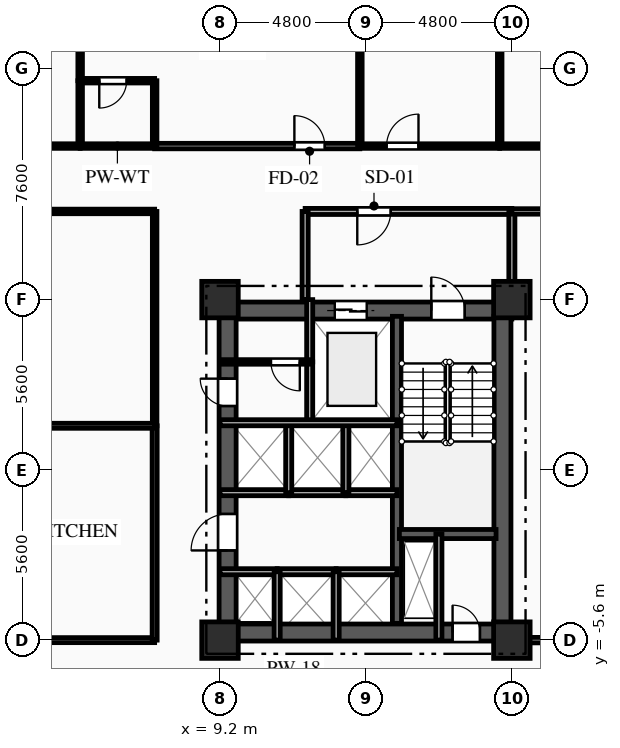
"""IFC4 building model, lengths in metres.
Left out: names, types, materials, properties, quantities, classifications, styles, units other than length and angle.
Written with IfcOpenShell. Run it as: python <this file> out.ifc"""

import sys

from ifc_helpers import new_model, si_unit, direction, frame, frame_2d, origin, origin_2d, place, context, subcontext, project, spatial, rectangle, extrude, element, fill, save


model = new_model("IFC4")
c1 = context("Model", 3, precision=1e-05, world=origin(), true_north=direction((0.0, 1.0)))
c2 = subcontext(c1, "Body", "Model", "MODEL_VIEW")
j1 = project(units=[si_unit("LENGTHUNIT", "METRE"), si_unit("PLANEANGLEUNIT", "RADIAN")], contexts=[c1])
p1 = place(None, origin())
s1 = spatial("IfcSite", under=j1, at=p1, CompositionType="ELEMENT")
p2 = place(p1, origin())
s2 = spatial("IfcBuilding", under=s1, at=p2, CompositionType="ELEMENT")
p3 = place(p2, frame((0.0, 0.0, 27.0)))
s3 = spatial("IfcBuildingStorey", under=s2, at=p3, CompositionType="ELEMENT", Elevation=27.0)
for number, where, z_axis, x_axis in (
    (1, (9.2, -5.6, 0.0), (0.0, 0.0, 1.0), (1.0, 0.0, 0.0)),
    (2, (9.2, 5.6, 0.0), (0.0, 0.0, 1.0), (1.0, 0.0, 0.0)),
    (3, (18.8, -5.6, 0.0), (0.0, 0.0, 1.0), (1.0, 0.0, 0.0)),
    (4, (18.8, 5.6, 0.0), (0.0, 0.0, 1.0), (1.0, 0.0, 0.0)),
):
    element("IfcColumn", number, at=place(p3, frame(where, z_axis=z_axis, x_axis=x_axis)), inside=s3, PredefinedType="COLUMN", context=c2, shape_type="SweptSolid", body=[
        extrude(rectangle(XDim=1.2, YDim=1.2, at=origin_2d()), origin(), (0.0, 0.0, 1.0), 3.35),
    ])
p4 = place(p3, frame((9.2, 5.24, 0.0), z_axis=(0.0, 0.0, 1.0), x_axis=(1.0, 0.0, 0.0)))
e5 = element("IfcWall", 5, at=p4, inside=s3, PredefinedType="SHEAR", context=c2, shape_type="SweptSolid", body=[
    extrude(rectangle(XDim=9.6, YDim=0.56, at=frame_2d((4.8, 0.0))), origin(), (0.0, 0.0, 1.0), 3.035),
])
p5 = place(p4, frame((6.95, 0.0, 0.0)))
e6 = element("IfcOpeningElement", 6, at=p5, cuts=e5, PredefinedType="OPENING", context=c2, shape_type="SweptSolid", body=[
    extrude(rectangle(XDim=1.1, YDim=2.15, at=frame_2d((0.55, 1.075))), frame((0.0, 0.29, 0.0), z_axis=(0.0, -1.0, 0.0), x_axis=(1.0, 0.0, 0.0)), (0.0, 0.0, 1.0), 0.58),
])
p6 = place(p4, frame((3.775, 0.0, 0.0)))
e7 = element("IfcOpeningElement", 7, at=p6, cuts=e5, PredefinedType="OPENING", context=c2, shape_type="SweptSolid", body=[
    extrude(rectangle(XDim=1.05, YDim=2.1, at=frame_2d((0.525, 1.05))), frame((0.0, 0.29, 0.0), z_axis=(0.0, -1.0, 0.0), x_axis=(1.0, 0.0, 0.0)), (0.0, 0.0, 1.0), 0.58),
])
p7 = place(p3, frame((9.2, -5.35, 0.0), z_axis=(0.0, 0.0, 1.0), x_axis=(1.0, 0.0, 0.0)))
e8 = element("IfcWall", 8, at=p7, inside=s3, PredefinedType="SHEAR", context=c2, shape_type="SweptSolid", body=[
    extrude(rectangle(XDim=9.6, YDim=0.56, at=frame_2d((4.8, 0.0))), origin(), (0.0, 0.0, 1.0), 3.035),
])
p8 = place(p7, frame((7.65, 0.0, 0.0)))
e9 = element("IfcOpeningElement", 9, at=p8, cuts=e8, PredefinedType="OPENING", context=c2, shape_type="SweptSolid", body=[
    extrude(rectangle(XDim=0.9, YDim=2.1, at=frame_2d((0.45, 1.05))), frame((0.0, 0.29, 0.0), z_axis=(0.0, -1.0, 0.0), x_axis=(1.0, 0.0, 0.0)), (0.0, 0.0, 1.0), 0.58),
])
p9 = place(p3, frame((9.45, -5.05, 0.0), z_axis=(0.0, 0.0, 1.0), x_axis=(0.0, 1.0, 0.0)))
e10 = element("IfcWall", 10, at=p9, inside=s3, PredefinedType="SHEAR", context=c2, shape_type="SweptSolid", body=[
    extrude(rectangle(XDim=10.1, YDim=0.56, at=frame_2d((5.05, 0.0))), origin(), (0.0, 0.0, 1.0), 3.035),
])
p10 = place(p9, frame((7.15, 0.0, 0.0)))
e11 = element("IfcOpeningElement", 11, at=p10, cuts=e10, PredefinedType="OPENING", context=c2, shape_type="SweptSolid", body=[
    extrude(rectangle(XDim=0.9, YDim=2.1, at=frame_2d((0.45, 1.05))), frame((0.0, 0.29, 0.0), z_axis=(0.0, -1.0, 0.0), x_axis=(1.0, 0.0, 0.0)), (0.0, 0.0, 1.0), 0.58),
])
p11 = place(p9, frame((2.4, 0.0, 0.0)))
e12 = element("IfcOpeningElement", 12, at=p11, cuts=e10, PredefinedType="OPENING", context=c2, shape_type="SweptSolid", body=[
    extrude(rectangle(XDim=1.2, YDim=2.15, at=frame_2d((0.6, 1.075))), frame((0.0, 0.29, 0.0), z_axis=(0.0, -1.0, 0.0), x_axis=(1.0, 0.0, 0.0)), (0.0, 0.0, 1.0), 0.58),
])
p12 = place(p3, frame((18.49, -5.05, 0.0), z_axis=(0.0, 0.0, 1.0), x_axis=(0.0, 1.0, 0.0)))
e13 = element("IfcWall", 13, at=p12, inside=s3, PredefinedType="SHEAR", context=c2, shape_type="SweptSolid", body=[
    extrude(rectangle(XDim=10.1, YDim=0.56, at=frame_2d((5.05, 0.0))), origin(), (0.0, 0.0, 1.0), 3.035),
])
p13 = place(p3, frame((15.02, -5.05, 0.0), z_axis=(0.0, 0.0, 1.0), x_axis=(0.0, 1.0, 0.0)))
e14 = element("IfcWall", 14, at=p13, inside=s3, PredefinedType="SHEAR", context=c2, shape_type="SweptSolid", body=[
    extrude(rectangle(XDim=10.1, YDim=0.3, at=frame_2d((5.05, 0.0))), origin(), (0.0, 0.0, 1.0), 3.035),
])
p14 = place(p3, frame((15.1, -2.11, 0.0), z_axis=(0.0, 0.0, 1.0), x_axis=(1.0, 0.0, 0.0)))
e15 = element("IfcWall", 15, at=p14, inside=s3, PredefinedType="SHEAR", context=c2, shape_type="SweptSolid", body=[
    extrude(rectangle(XDim=3.18, YDim=0.3, at=frame_2d((1.59, 0.0))), origin(), (0.0, 0.0, 1.0), 3.035),
])
p15 = place(p3, frame((16.4, -2.11, 0.0), z_axis=(0.0, 0.0, 1.0), x_axis=(0.0, -1.0, 0.0)))
e16 = element("IfcWall", 16, at=p15, inside=s3, PredefinedType="PARTITIONING", context=c2, shape_type="SweptSolid", body=[
    extrude(rectangle(XDim=3.49, YDim=0.2, at=frame_2d((1.745, 0.0))), origin(), (0.0, 0.0, 1.0), 3.035),
])
p16 = place(p3, frame((12.15, 3.55, 0.0), z_axis=(0.0, 0.0, 1.0), x_axis=(0.0, -1.0, 0.0)))
e17 = element("IfcWall", 17, at=p16, inside=s3, PredefinedType="PARTITIONING", context=c2, shape_type="SweptSolid", body=[
    extrude(rectangle(XDim=2.0, YDim=0.2, at=frame_2d((1.0, 0.0))), origin(), (0.0, 0.0, 1.0), 3.035),
])
p17 = place(p3, frame((12.15, 5.6, 0.0), z_axis=(0.0, 0.0, 1.0), x_axis=(0.0, -1.0, 0.0)))
e18 = element("IfcWall", 18, at=p17, inside=s3, PredefinedType="PARTITIONING", context=c2, shape_type="SweptSolid", body=[
    extrude(rectangle(XDim=2.05, YDim=0.2, at=frame_2d((1.025, 0.0))), origin(), (0.0, 0.0, 1.0), 3.035),
])
p18 = place(p3, frame((18.8, 8.5, 0.0), z_axis=(0.0, 0.0, 1.0), x_axis=(-1.0, 0.0, 0.0)))
e19 = element("IfcWall", 19, at=p18, inside=s3, PredefinedType="PARTITIONING", context=c2, shape_type="SweptSolid", body=[
    extrude(rectangle(XDim=6.8, YDim=0.2, at=frame_2d((3.4, 0.0))), origin(), (0.0, 0.0, 1.0), 3.035),
])
p19 = place(p18, frame((3.985, 0.0, 0.0)))
e20 = element("IfcOpeningElement", 20, at=p19, cuts=e19, PredefinedType="OPENING", context=c2, shape_type="SweptSolid", body=[
    extrude(rectangle(XDim=1.1, YDim=2.15, at=frame_2d((0.55, 1.075))), frame((0.0, 0.11, 0.0), z_axis=(0.0, -1.0, 0.0), x_axis=(1.0, 0.0, 0.0)), (0.0, 0.0, 1.0), 0.22),
])
p20 = place(p3, frame((12.0, 8.5, 0.0), z_axis=(0.0, 0.0, 1.0), x_axis=(0.0, -1.0, 0.0)))
e21 = element("IfcWall", 21, at=p20, inside=s3, PredefinedType="PARTITIONING", context=c2, shape_type="SweptSolid", body=[
    extrude(rectangle(XDim=2.9, YDim=0.2, at=frame_2d((1.45, 0.0))), origin(), (0.0, 0.0, 1.0), 3.035),
])
p21 = place(p3, frame((18.8, 5.6, 0.0), z_axis=(0.0, 0.0, 1.0), x_axis=(0.0, 1.0, 0.0)))
e22 = element("IfcWall", 22, at=p21, inside=s3, PredefinedType="PARTITIONING", context=c2, shape_type="SweptSolid", body=[
    extrude(rectangle(XDim=2.9, YDim=0.2, at=frame_2d((1.45, 0.0))), origin(), (0.0, 0.0, 1.0), 2.52),
])
p22 = place(p3, frame((12.15, 3.55, 0.0), z_axis=(0.0, 0.0, 1.0), x_axis=(-1.0, 0.0, 0.0)))
e23 = element("IfcWall", 23, at=p22, inside=s3, PredefinedType="PARTITIONING", context=c2, shape_type="SweptSolid", body=[
    extrude(rectangle(XDim=2.95, YDim=0.15, at=frame_2d((1.475, 0.0))), origin(), (0.0, 0.0, 1.0), 3.035),
])
p23 = place(p22, frame((0.325, 0.0, 0.0)))
e24 = element("IfcOpeningElement", 24, at=p23, cuts=e23, PredefinedType="OPENING", context=c2, shape_type="SweptSolid", body=[
    extrude(rectangle(XDim=0.95, YDim=2.1, at=frame_2d((0.475, 1.05))), frame((0.0, 0.085, 0.0), z_axis=(0.0, -1.0, 0.0), x_axis=(1.0, 0.0, 0.0)), (0.0, 0.0, 1.0), 0.17),
])
p24 = place(p3, frame((9.2, -3.35, 0.0), z_axis=(0.0, 0.0, 1.0), x_axis=(1.0, 0.0, 0.0)))
e25 = element("IfcWall", 25, at=p24, inside=s3, PredefinedType="PARTITIONING", context=c2, shape_type="SweptSolid", body=[
    extrude(rectangle(XDim=1.88, YDim=0.2, at=frame_2d((0.94, 0.0))), origin(), (0.0, 0.0, 1.0), 2.75),
])
p25 = place(p3, frame((11.08, -3.35, 0.0), z_axis=(0.0, 0.0, 1.0), x_axis=(1.0, 0.0, 0.0)))
e26 = element("IfcWall", 26, at=p25, inside=s3, PredefinedType="PARTITIONING", context=c2, shape_type="SweptSolid", body=[
    extrude(rectangle(XDim=1.94, YDim=0.2, at=frame_2d((0.97, 0.0))), origin(), (0.0, 0.0, 1.0), 3.035),
])
p26 = place(p3, frame((13.02, -3.35, 0.0), z_axis=(0.0, 0.0, 1.0), x_axis=(1.0, 0.0, 0.0)))
e27 = element("IfcWall", 27, at=p26, inside=s3, PredefinedType="PARTITIONING", context=c2, shape_type="SweptSolid", body=[
    extrude(rectangle(XDim=2.0, YDim=0.2, at=frame_2d((1.0, 0.0))), origin(), (0.0, 0.0, 1.0), 3.035),
])
p27 = place(p3, frame((11.46, -0.75, 0.0), z_axis=(0.0, 0.0, 1.0), x_axis=(-1.0, 0.0, 0.0)))
e28 = element("IfcWall", 28, at=p27, inside=s3, PredefinedType="PARTITIONING", context=c2, shape_type="SweptSolid", body=[
    extrude(rectangle(XDim=2.26, YDim=0.2, at=frame_2d((1.13, 0.0))), origin(), (0.0, 0.0, 1.0), 3.035),
])
p28 = place(p3, frame((13.34, -0.75, 0.0), z_axis=(0.0, 0.0, 1.0), x_axis=(-1.0, 0.0, 0.0)))
e29 = element("IfcWall", 29, at=p28, inside=s3, PredefinedType="PARTITIONING", context=c2, shape_type="SweptSolid", body=[
    extrude(rectangle(XDim=1.88, YDim=0.2, at=frame_2d((0.94, 0.0))), origin(), (0.0, 0.0, 1.0), 3.035),
])
p29 = place(p3, frame((15.02, -0.75, 0.0), z_axis=(0.0, 0.0, 1.0), x_axis=(-1.0, 0.0, 0.0)))
e30 = element("IfcWall", 30, at=p29, inside=s3, PredefinedType="PARTITIONING", context=c2, shape_type="SweptSolid", body=[
    extrude(rectangle(XDim=1.68, YDim=0.2, at=frame_2d((0.84, 0.0))), origin(), (0.0, 0.0, 1.0), 3.035),
])
for number, where, z_axis, x_axis in (
    (31, (11.08, -5.6, 0.0), (0.0, 0.0, 1.0), (0.0, 1.0, 0.0)),
    (32, (13.02, -5.6, 0.0), (0.0, 0.0, 1.0), (0.0, 1.0, 0.0)),
):
    element("IfcWall", number, at=place(p3, frame(where, z_axis=z_axis, x_axis=x_axis)), inside=s3, PredefinedType="PARTITIONING", context=c2, shape_type="SweptSolid", body=[
        extrude(rectangle(XDim=2.25, YDim=0.2, at=frame_2d((1.125, 0.0))), origin(), (0.0, 0.0, 1.0), 3.035),
    ])
for number, where, z_axis, x_axis in (
    (33, (11.46, -0.75, 0.0), (0.0, 0.0, 1.0), (0.0, 1.0, 0.0)),
    (34, (13.34, -0.75, 0.0), (0.0, 0.0, 1.0), (0.0, 1.0, 0.0)),
):
    element("IfcWall", number, at=place(p3, frame(where, z_axis=z_axis, x_axis=x_axis)), inside=s3, PredefinedType="PARTITIONING", context=c2, shape_type="SweptSolid", body=[
        extrude(rectangle(XDim=2.3, YDim=0.2, at=frame_2d((1.15, 0.0))), origin(), (0.0, 0.0, 1.0), 3.035),
    ])
p30 = place(p3, frame((21.45, 8.5, 0.0), z_axis=(0.0, 0.0, 1.0), x_axis=(-1.0, 0.0, 0.0)))
e35 = element("IfcWall", 35, at=p30, inside=s3, PredefinedType="PARTITIONING", context=c2, shape_type="SweptSolid", body=[
    extrude(rectangle(XDim=2.65, YDim=0.18, at=frame_2d((1.325, 0.0))), origin(), (0.0, 0.0, 1.0), 3.035),
])
p31 = place(p30, frame((0.641, 0.0, 0.0)))
e36 = element("IfcOpeningElement", 36, at=p31, cuts=e35, PredefinedType="OPENING", context=c2, shape_type="SweptSolid", body=[
    extrude(rectangle(XDim=1.0, YDim=2.15, at=frame_2d((0.5, 1.075))), frame((0.0, 0.1, 0.0), z_axis=(0.0, -1.0, 0.0), x_axis=(1.0, 0.0, 0.0)), (0.0, 0.0, 1.0), 0.2),
])
p32 = place(p3, frame((0.0, 10.65, 0.0), z_axis=(0.0, 0.0, 1.0), x_axis=(1.0, 0.0, 0.0)))
e37 = element("IfcWall", 37, at=p32, inside=s3, PredefinedType="PARTITIONING", context=c2, shape_type="SweptSolid", body=[
    extrude(rectangle(XDim=4.6, YDim=0.15, at=frame_2d((2.3, 0.0))), origin(), (0.0, 0.0, 1.0), 3.035),
])
p33 = place(p3, frame((7.05, 10.65, 0.0), z_axis=(0.0, 0.0, 1.0), x_axis=(1.0, 0.0, 0.0)))
e38 = element("IfcWall", 38, at=p33, inside=s3, PredefinedType="PARTITIONING", context=c2, shape_type="SweptSolid", body=[
    extrude(rectangle(XDim=6.75, YDim=0.18, at=frame_2d((3.375, 0.0))), origin(), (0.0, 0.0, 1.0), 3.035),
])
p34 = place(p33, frame((4.596, 0.0, 0.0)))
e39 = element("IfcOpeningElement", 39, at=p34, cuts=e38, PredefinedType="OPENING", context=c2, shape_type="SweptSolid", body=[
    extrude(rectangle(XDim=1.0, YDim=2.15, at=frame_2d((0.5, 1.075))), frame((0.0, 0.1, 0.0), z_axis=(0.0, -1.0, 0.0), x_axis=(1.0, 0.0, 0.0)), (0.0, 0.0, 1.0), 0.2),
])
p35 = place(p3, frame((4.6, 10.65, 0.0), z_axis=(0.0, 0.0, 1.0), x_axis=(1.0, 0.0, 0.0)))
e40 = element("IfcWall", 40, at=p35, inside=s3, PredefinedType="PLUMBINGWALL", context=c2, shape_type="SweptSolid", body=[
    extrude(rectangle(XDim=2.45, YDim=0.15, at=frame_2d((1.225, 0.0))), origin(), (0.0, 0.0, 1.0), 3.035),
])
p36 = place(p3, frame((13.8, 10.65, 0.0), z_axis=(0.0, 0.0, 1.0), x_axis=(1.0, 0.0, 0.0)))
e41 = element("IfcWall", 41, at=p36, inside=s3, PredefinedType="PARTITIONING", context=c2, shape_type="SweptSolid", body=[
    extrude(rectangle(XDim=4.6, YDim=0.15, at=frame_2d((2.3, 0.0))), origin(), (0.0, 0.0, 1.0), 3.035),
])
p37 = place(p36, frame((0.879, 0.0, 0.0)))
e42 = element("IfcOpeningElement", 42, at=p37, cuts=e41, PredefinedType="OPENING", context=c2, shape_type="SweptSolid", body=[
    extrude(rectangle(XDim=1.05, YDim=2.15, at=frame_2d((0.525, 1.075))), frame((0.0, 0.085, 0.0), z_axis=(0.0, -1.0, 0.0), x_axis=(1.0, 0.0, 0.0)), (0.0, 0.0, 1.0), 0.17),
])
p38 = place(p3, frame((18.4, 10.65, 0.0), z_axis=(0.0, 0.0, 1.0), x_axis=(1.0, 0.0, 0.0)))
e43 = element("IfcWall", 43, at=p38, inside=s3, PredefinedType="PARTITIONING", context=c2, shape_type="SweptSolid", body=[
    extrude(rectangle(XDim=4.6, YDim=0.15, at=frame_2d((2.3, 0.0))), origin(), (0.0, 0.0, 1.0), 3.035),
])
p39 = place(p38, frame((2.671, 0.0, 0.0)))
e44 = element("IfcOpeningElement", 44, at=p39, cuts=e43, PredefinedType="OPENING", context=c2, shape_type="SweptSolid", body=[
    extrude(rectangle(XDim=1.05, YDim=2.15, at=frame_2d((0.525, 1.075))), frame((0.0, 0.085, 0.0), z_axis=(0.0, -1.0, 0.0), x_axis=(1.0, 0.0, 0.0)), (0.0, 0.0, 1.0), 0.17),
])
p40 = place(p3, frame((7.05, 8.5, 0.0), z_axis=(0.0, 0.0, 1.0), x_axis=(-1.0, 0.0, 0.0)))
e45 = element("IfcWall", 45, at=p40, inside=s3, PredefinedType="PARTITIONING", context=c2, shape_type="SweptSolid", body=[
    extrude(rectangle(XDim=7.05, YDim=0.15, at=frame_2d((3.525, 0.0))), origin(), (0.0, 0.0, 1.0), 3.035),
])
p41 = place(p3, frame((18.8, -5.6, 0.0), z_axis=(0.0, 0.0, 1.0), x_axis=(1.0, 0.0, 0.0)))
e46 = element("IfcWall", 46, at=p41, inside=s3, PredefinedType="PARTITIONING", context=c2, shape_type="SweptSolid", body=[
    extrude(rectangle(XDim=2.65, YDim=0.18, at=frame_2d((1.325, 0.0))), origin(), (0.0, 0.0, 1.0), 3.035),
])
p42 = place(p3, frame((0.0, -5.6, 0.0), z_axis=(0.0, 0.0, 1.0), x_axis=(1.0, 0.0, 0.0)))
e47 = element("IfcWall", 47, at=p42, inside=s3, PredefinedType="PARTITIONING", context=c2, shape_type="SweptSolid", body=[
    extrude(rectangle(XDim=7.05, YDim=0.165, at=frame_2d((3.525, 0.0))), origin(), (0.0, 0.0, 1.0), 2.52),
])
p43 = place(p3, frame((7.05, -5.6, 0.0), z_axis=(0.0, 0.0, 1.0), x_axis=(0.0, 1.0, 0.0)))
e48 = element("IfcWall", 48, at=p43, inside=s3, PredefinedType="PARTITIONING", context=c2, shape_type="SweptSolid", body=[
    extrude(rectangle(XDim=7.05, YDim=0.165, at=frame_2d((3.525, 0.0))), origin(), (0.0, 0.0, 1.0), 3.035),
])
p44 = place(p3, frame((7.05, 1.45, 0.0), z_axis=(0.0, 0.0, 1.0), x_axis=(0.0, 1.0, 0.0)))
e49 = element("IfcWall", 49, at=p44, inside=s3, PredefinedType="PARTITIONING", context=c2, shape_type="SweptSolid", body=[
    extrude(rectangle(XDim=7.05, YDim=0.15, at=frame_2d((3.525, 0.0))), origin(), (0.0, 0.0, 1.0), 3.035),
])
p45 = place(p3, frame((4.6, 19.4, 0.0), z_axis=(0.0, 0.0, 1.0), x_axis=(0.0, -1.0, 0.0)))
e50 = element("IfcWall", 50, at=p45, inside=s3, PredefinedType="PARTITIONING", context=c2, shape_type="SweptSolid", body=[
    extrude(rectangle(XDim=6.6, YDim=0.15, at=frame_2d((3.3, 0.0))), origin(), (0.0, 0.0, 1.0), 3.035),
])
p46 = place(p3, frame((4.6, 12.8, 0.0), z_axis=(0.0, 0.0, 1.0), x_axis=(0.0, -1.0, 0.0)))
e51 = element("IfcWall", 51, at=p46, inside=s3, PredefinedType="PLUMBINGWALL", context=c2, shape_type="SweptSolid", body=[
    extrude(rectangle(XDim=2.15, YDim=0.15, at=frame_2d((1.075, 0.0))), origin(), (0.0, 0.0, 1.0), 3.035),
])
p47 = place(p3, frame((7.05, 12.8, 0.0), z_axis=(0.0, 0.0, 1.0), x_axis=(-1.0, 0.0, 0.0)))
e52 = element("IfcWall", 52, at=p47, inside=s3, PredefinedType="PLUMBINGWALL", context=c2, shape_type="SweptSolid", body=[
    extrude(rectangle(XDim=2.45, YDim=0.15, at=frame_2d((1.225, 0.0))), origin(), (0.0, 0.0, 1.0), 3.035),
])
p48 = place(p47, frame((0.921, 0.0, 0.0)))
e53 = element("IfcOpeningElement", 53, at=p48, cuts=e52, PredefinedType="OPENING", context=c2, shape_type="SweptSolid", body=[
    extrude(rectangle(XDim=0.9, YDim=2.1, at=frame_2d((0.45, 1.05))), frame((0.0, 0.085, 0.0), z_axis=(0.0, -1.0, 0.0), x_axis=(1.0, 0.0, 0.0)), (0.0, 0.0, 1.0), 0.17),
])
p49 = place(p3, frame((7.05, 10.65, 0.0), z_axis=(0.0, 0.0, 1.0), x_axis=(0.0, 1.0, 0.0)))
e54 = element("IfcWall", 54, at=p49, inside=s3, PredefinedType="PLUMBINGWALL", context=c2, shape_type="SweptSolid", body=[
    extrude(rectangle(XDim=2.15, YDim=0.15, at=frame_2d((1.075, 0.0))), origin(), (0.0, 0.0, 1.0), 3.035),
])
for number, where, z_axis, x_axis in (
    (55, (13.8, 19.4, 0.0), (0.0, 0.0, 1.0), (0.0, -1.0, 0.0)),
    (56, (18.4, 19.4, 0.0), (0.0, 0.0, 1.0), (0.0, -1.0, 0.0)),
):
    element("IfcWall", number, at=place(p3, frame(where, z_axis=z_axis, x_axis=x_axis)), inside=s3, PredefinedType="PARTITIONING", context=c2, shape_type="SweptSolid", body=[
        extrude(rectangle(XDim=8.75, YDim=0.15, at=frame_2d((4.375, 0.0))), origin(), (0.0, 0.0, 1.0), 3.035),
    ])
p50 = place(p3, frame((-7.05, 1.45, 0.0), z_axis=(0.0, 0.0, 1.0), x_axis=(1.0, 0.0, 0.0)))
e57 = element("IfcWall", 57, at=p50, inside=s3, PredefinedType="PARTITIONING", context=c2, shape_type="SweptSolid", body=[
    extrude(rectangle(XDim=14.1, YDim=0.165, at=frame_2d((7.05, 0.0))), origin(), (0.0, 0.0, 1.0), 3.035),
])
p51 = place(p3, frame((9.2, 1.55, 0.0), z_axis=(0.0, 0.0, 1.0), x_axis=(1.0, 0.0, 0.0)))
e58 = element("IfcWall", 58, at=p51, inside=s3, PredefinedType="PARTITIONING", context=c2, shape_type="SweptSolid", body=[
    extrude(rectangle(XDim=5.82, YDim=0.2, at=frame_2d((2.91, 0.0))), origin(), (0.0, 0.0, 1.0), 3.035),
])
p52 = place(p5, origin())
e59 = element("IfcDoor", 59, at=p52, inside=s3, OperationType="SINGLE_SWING_LEFT", PredefinedType="DOOR", context=c2, shape_type="SweptSolid", body=[
    extrude(rectangle(XDim=1.1, YDim=2.15, at=frame_2d((0.55, 1.075))), frame((0.0, 0.025, 0.0), z_axis=(0.0, -1.0, 0.0), x_axis=(1.0, 0.0, 0.0)), (0.0, 0.0, 1.0), 0.05),
])
fill(e6, e59)
p53 = place(p6, origin())
e60 = element("IfcDoor", 60, at=p53, inside=s3, OperationType="DOUBLE_DOOR_SLIDING", PredefinedType="DOOR", context=c2, shape_type="SweptSolid", body=[
    extrude(rectangle(XDim=1.05, YDim=2.1, at=frame_2d((0.525, 1.05))), frame((0.0, 0.025, 0.0), z_axis=(0.0, -1.0, 0.0), x_axis=(1.0, 0.0, 0.0)), (0.0, 0.0, 1.0), 0.05),
])
fill(e7, e60)
p54 = place(p8, origin())
e61 = element("IfcDoor", 61, at=p54, inside=s3, OperationType="SINGLE_SWING_LEFT", PredefinedType="DOOR", context=c2, shape_type="SweptSolid", body=[
    extrude(rectangle(XDim=0.9, YDim=2.1, at=frame_2d((0.45, 1.05))), frame((0.0, 0.025, 0.0), z_axis=(0.0, -1.0, 0.0), x_axis=(1.0, 0.0, 0.0)), (0.0, 0.0, 1.0), 0.05),
])
fill(e9, e61)
p55 = place(p19, origin())
e62 = element("IfcDoor", 62, at=p55, inside=s3, OperationType="SINGLE_SWING_RIGHT", PredefinedType="DOOR", context=c2, shape_type="SweptSolid", body=[
    extrude(rectangle(XDim=1.1, YDim=2.15, at=frame_2d((0.55, 1.075))), frame((0.0, 0.025, 0.0), z_axis=(0.0, -1.0, 0.0), x_axis=(1.0, 0.0, 0.0)), (0.0, 0.0, 1.0), 0.05),
])
fill(e20, e62)
p56 = place(p23, origin())
e63 = element("IfcDoor", 63, at=p56, inside=s3, OperationType="SINGLE_SWING_LEFT", PredefinedType="DOOR", context=c2, shape_type="SweptSolid", body=[
    extrude(rectangle(XDim=0.95, YDim=2.1, at=frame_2d((0.475, 1.05))), frame((0.0, 0.025, 0.0), z_axis=(0.0, -1.0, 0.0), x_axis=(1.0, 0.0, 0.0)), (0.0, 0.0, 1.0), 0.05),
])
fill(e24, e63)
p57 = place(p10, origin())
e64 = element("IfcDoor", 64, at=p57, inside=s3, OperationType="SINGLE_SWING_RIGHT", PredefinedType="DOOR", context=c2, shape_type="SweptSolid", body=[
    extrude(rectangle(XDim=0.9, YDim=2.1, at=frame_2d((0.45, 1.05))), frame((0.0, 0.025, 0.0), z_axis=(0.0, -1.0, 0.0), x_axis=(1.0, 0.0, 0.0)), (0.0, 0.0, 1.0), 0.05),
])
fill(e11, e64)
p58 = place(p11, origin())
e65 = element("IfcDoor", 65, at=p58, inside=s3, OperationType="SINGLE_SWING_LEFT", PredefinedType="DOOR", context=c2, shape_type="SweptSolid", body=[
    extrude(rectangle(XDim=1.2, YDim=2.15, at=frame_2d((0.6, 1.075))), frame((0.0, 0.025, 0.0), z_axis=(0.0, -1.0, 0.0), x_axis=(1.0, 0.0, 0.0)), (0.0, 0.0, 1.0), 0.05),
])
fill(e12, e65)
p59 = place(p34, origin())
e66 = element("IfcDoor", 66, at=p59, inside=s3, OperationType="SINGLE_SWING_LEFT", PredefinedType="DOOR", context=c2, shape_type="SweptSolid", body=[
    extrude(rectangle(XDim=1.0, YDim=2.15, at=frame_2d((0.5, 1.075))), frame((0.0, 0.025, 0.0), z_axis=(0.0, -1.0, 0.0), x_axis=(1.0, 0.0, 0.0)), (0.0, 0.0, 1.0), 0.05),
])
fill(e39, e66)
p60 = place(p37, origin())
e67 = element("IfcDoor", 67, at=p60, inside=s3, OperationType="SINGLE_SWING_RIGHT", PredefinedType="DOOR", context=c2, shape_type="SweptSolid", body=[
    extrude(rectangle(XDim=1.05, YDim=2.15, at=frame_2d((0.525, 1.075))), frame((0.0, 0.025, 0.0), z_axis=(0.0, -1.0, 0.0), x_axis=(1.0, 0.0, 0.0)), (0.0, 0.0, 1.0), 0.05),
])
fill(e42, e67)
p61 = place(p48, origin())
e68 = element("IfcDoor", 68, at=p61, inside=s3, OperationType="SINGLE_SWING_RIGHT", PredefinedType="DOOR", context=c2, shape_type="SweptSolid", body=[
    extrude(rectangle(XDim=0.9, YDim=2.1, at=frame_2d((0.45, 1.05))), frame((0.0, 0.025, 0.0), z_axis=(0.0, -1.0, 0.0), x_axis=(1.0, 0.0, 0.0)), (0.0, 0.0, 1.0), 0.05),
])
fill(e53, e68)
save(model, sys.argv[1])
